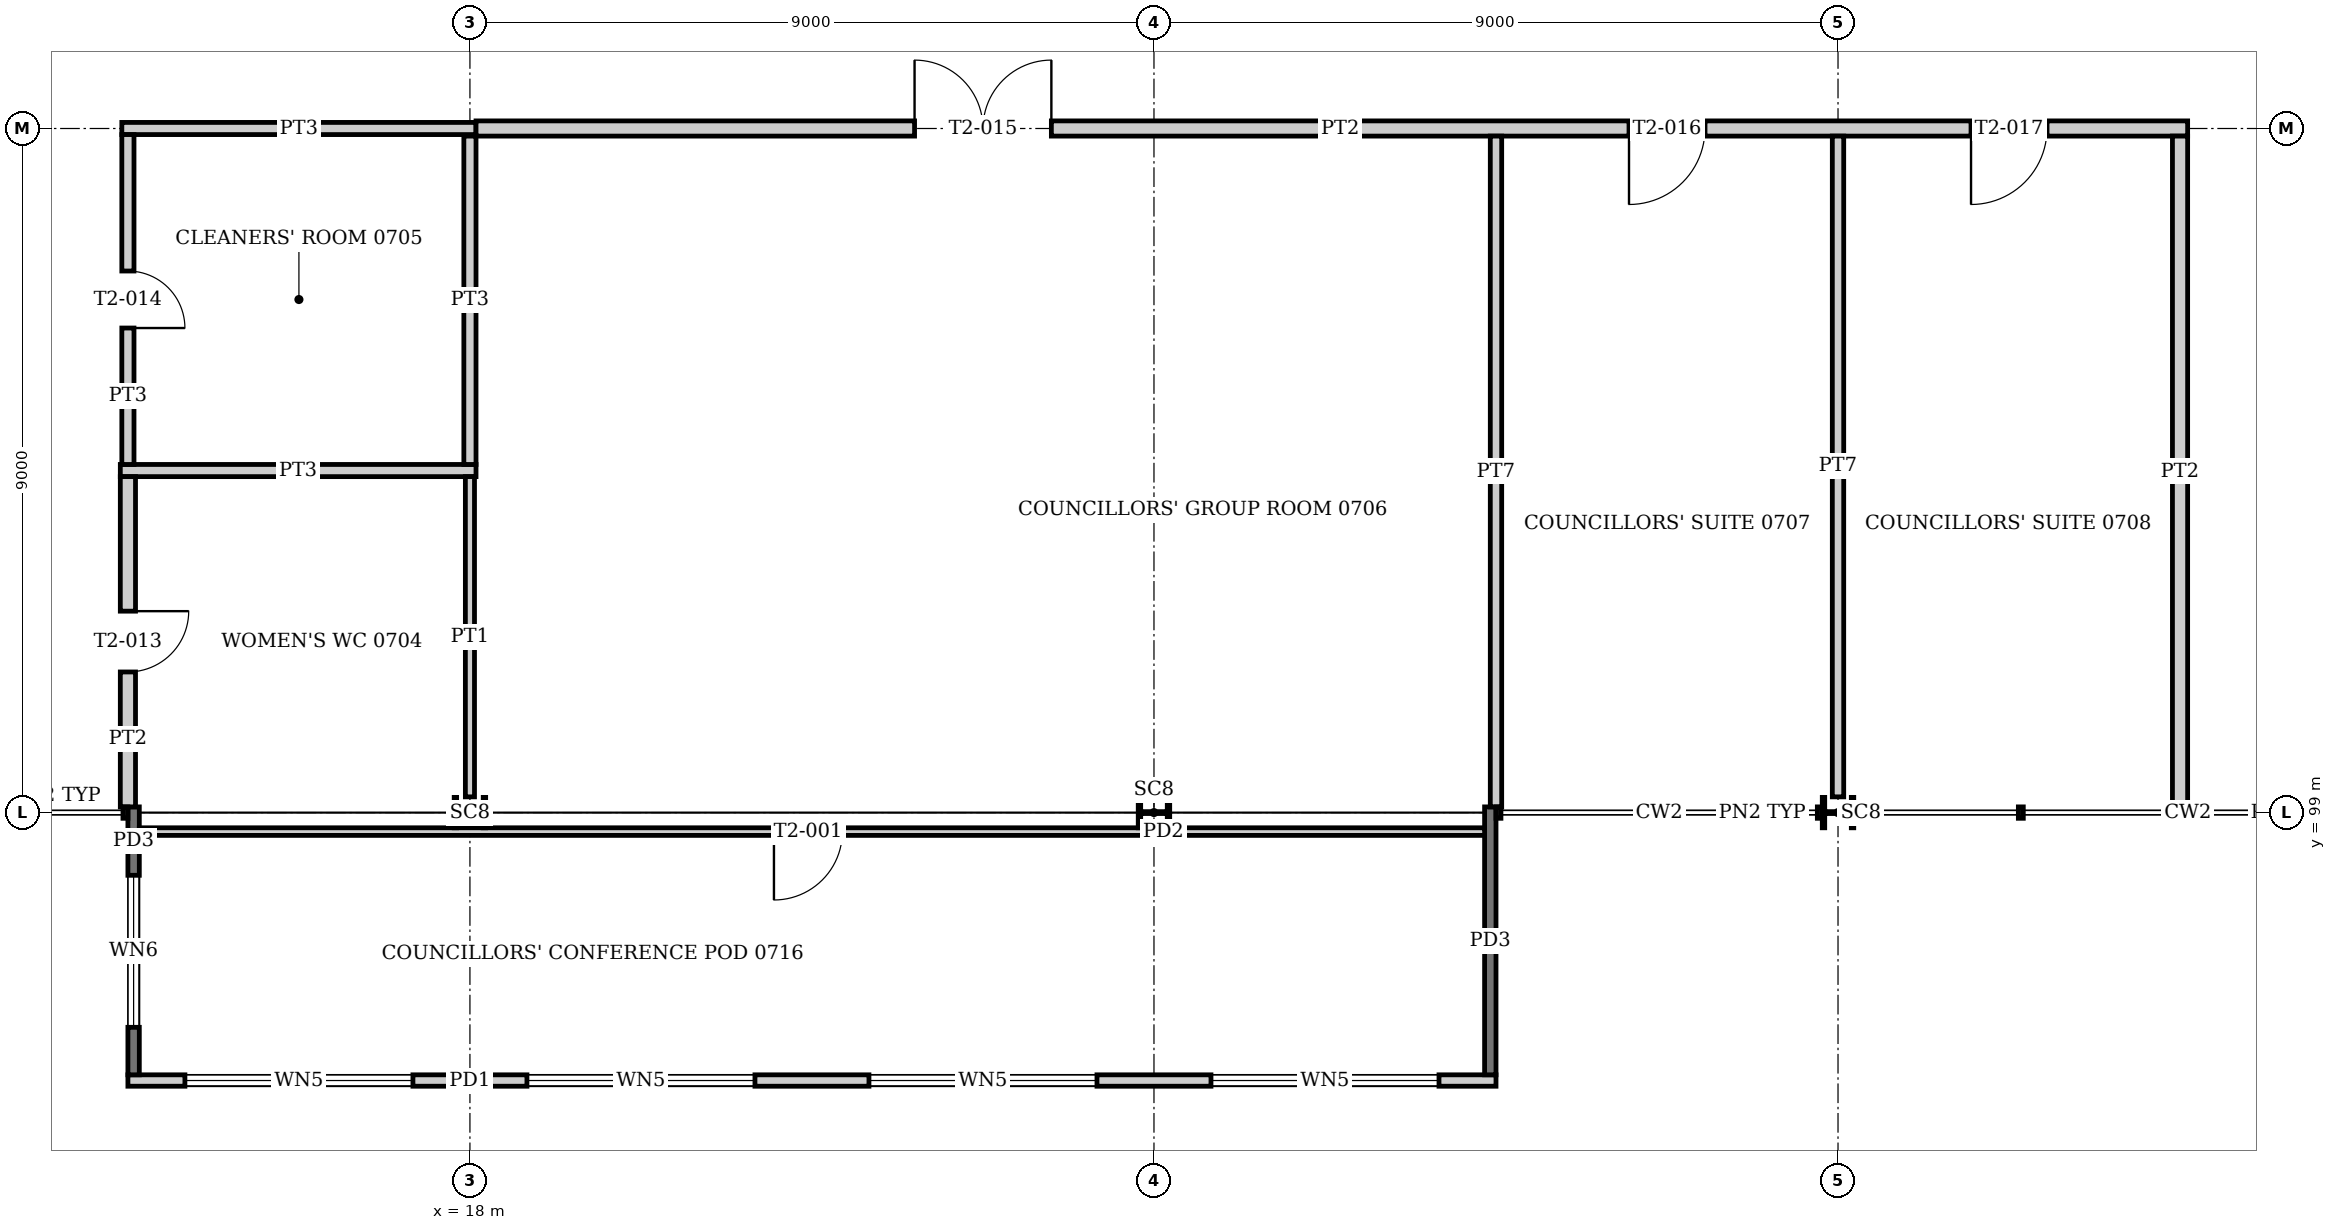
"""IFC4 building model, lengths in metres.
Left out: names, types, materials, properties, quantities, classifications, styles, units other than length and angle.
Written with IfcOpenShell. Run it as: python <this file> out.ifc"""

import sys

from ifc_helpers import new_model, si_unit, direction, frame, frame_2d, origin, origin_2d, place, context, subcontext, project, spatial, rectangle, i_section, extrude, element, fill, save


model = new_model("IFC4")
c1 = context("Model", 3, precision=1e-05, world=origin(), true_north=direction((0.0, 1.0)))
c2 = subcontext(c1, "Body", "Model", "MODEL_VIEW")
j1 = project(units=[si_unit("LENGTHUNIT", "METRE"), si_unit("PLANEANGLEUNIT", "RADIAN")], contexts=[c1])
p1 = place(None, origin())
s1 = spatial("IfcSite", under=j1, at=p1, CompositionType="ELEMENT")
p2 = place(p1, origin())
s2 = spatial("IfcBuilding", under=s1, at=p2, CompositionType="ELEMENT")
p3 = place(p2, frame((0.0, 0.0, 31.2)))
s3 = spatial("IfcBuildingStorey", under=s2, at=p3, CompositionType="ELEMENT", Elevation=31.2)
for number, where, z_axis, x_axis in (
    (1, (18.0, 99.0, 0.0), (0.0, 0.0, 1.0), (0.0, 1.0, 0.0)),
    (2, (27.0, 99.0, 0.0), (0.0, 0.0, 1.0), (0.0, 1.0, 0.0)),
    (3, (36.0, 99.0, 0.0), (0.0, 0.0, 1.0), (0.0, 1.0, 0.0)),
):
    element("IfcColumn", number, at=place(p3, frame(where, z_axis=z_axis, x_axis=x_axis)), inside=s3, PredefinedType="COLUMN", context=c2, shape_type="SweptSolid", body=[
        extrude(i_section(OverallWidth=0.4, OverallDepth=0.414, WebThickness=0.025, FlangeThickness=0.032, at=origin_2d()), origin(), (0.0, 0.0, 1.0), 4.0),
    ])
p4 = place(p3, frame((13.5, 95.475, 0.0), z_axis=(0.0, 0.0, 1.0), x_axis=(1.0, 0.0, 0.0)))
e4 = element("IfcWall", 4, at=p4, inside=s3, PredefinedType="SOLIDWALL", context=c2, shape_type="SweptSolid", body=[
    extrude(rectangle(XDim=18.0, YDim=0.15, at=frame_2d((9.0, 0.0))), origin(), (0.0, 0.0, 1.0), 2.6),
])
p5 = place(p4, frame((0.75, 0.0, 0.9)))
e5 = element("IfcOpeningElement", 5, at=p5, cuts=e4, PredefinedType="OPENING", context=c2, shape_type="SweptSolid", body=[
    extrude(rectangle(XDim=3.0, YDim=1.4, at=frame_2d((1.5, 0.7))), frame((0.0, 0.085, 0.0), z_axis=(0.0, -1.0, 0.0), x_axis=(1.0, 0.0, 0.0)), (0.0, 0.0, 1.0), 0.17),
])
p6 = place(p4, frame((5.25, 0.0, 0.9)))
e6 = element("IfcOpeningElement", 6, at=p6, cuts=e4, PredefinedType="OPENING", context=c2, shape_type="SweptSolid", body=[
    extrude(rectangle(XDim=3.0, YDim=1.4, at=frame_2d((1.5, 0.7))), frame((0.0, 0.085, 0.0), z_axis=(0.0, -1.0, 0.0), x_axis=(1.0, 0.0, 0.0)), (0.0, 0.0, 1.0), 0.17),
])
p7 = place(p4, frame((9.75, 0.0, 0.9)))
e7 = element("IfcOpeningElement", 7, at=p7, cuts=e4, PredefinedType="OPENING", context=c2, shape_type="SweptSolid", body=[
    extrude(rectangle(XDim=3.0, YDim=1.4, at=frame_2d((1.5, 0.7))), frame((0.0, 0.085, 0.0), z_axis=(0.0, -1.0, 0.0), x_axis=(1.0, 0.0, 0.0)), (0.0, 0.0, 1.0), 0.17),
])
p8 = place(p4, frame((14.25, 0.0, 0.9)))
e8 = element("IfcOpeningElement", 8, at=p8, cuts=e4, PredefinedType="OPENING", context=c2, shape_type="SweptSolid", body=[
    extrude(rectangle(XDim=3.0, YDim=1.4, at=frame_2d((1.5, 0.7))), frame((0.0, 0.085, 0.0), z_axis=(0.0, -1.0, 0.0), x_axis=(1.0, 0.0, 0.0)), (0.0, 0.0, 1.0), 0.17),
])
p9 = place(p3, frame((13.575, 95.55, -0.15), z_axis=(0.0, 0.0, 1.0), x_axis=(0.0, 1.0, 0.0)))
e9 = element("IfcWall", 9, at=p9, inside=s3, PredefinedType="SOLIDWALL", context=c2, shape_type="SweptSolid", body=[
    extrude(rectangle(XDim=3.525, YDim=0.15, at=frame_2d((1.762, 0.0))), origin(), (0.0, 0.0, 1.0), 2.75),
])
p10 = place(p9, frame((0.625, 0.0, 1.05)))
e10 = element("IfcOpeningElement", 10, at=p10, cuts=e9, PredefinedType="OPENING", context=c2, shape_type="SweptSolid", body=[
    extrude(rectangle(XDim=2.0, YDim=1.4, at=frame_2d((1.0, 0.7))), frame((0.0, 0.085, 0.0), z_axis=(0.0, -1.0, 0.0), x_axis=(1.0, 0.0, 0.0)), (0.0, 0.0, 1.0), 0.17),
])
p11 = place(p3, frame((31.425, 95.55, -0.15), z_axis=(0.0, 0.0, 1.0), x_axis=(0.0, 1.0, 0.0)))
e11 = element("IfcWall", 11, at=p11, inside=s3, PredefinedType="SOLIDWALL", context=c2, shape_type="SweptSolid", body=[
    extrude(rectangle(XDim=3.525, YDim=0.15, at=frame_2d((1.762, 0.0))), origin(), (0.0, 0.0, 1.0), 2.75),
])
p12 = place(p3, frame((13.65, 98.75, 0.0), z_axis=(0.0, 0.0, 1.0), x_axis=(1.0, 0.0, 0.0)))
e12 = element("IfcWall", 12, at=p12, inside=s3, PredefinedType="PARTITIONING", context=c2, shape_type="SweptSolid", body=[
    extrude(rectangle(XDim=17.7, YDim=0.1, at=frame_2d((8.85, 0.0))), origin(), (0.0, 0.0, 1.0), 2.6),
])
p13 = place(p12, frame((8.35, 0.0, 0.0)))
e13 = element("IfcOpeningElement", 13, at=p13, cuts=e12, PredefinedType="OPENING", context=c2, shape_type="SweptSolid", body=[
    extrude(rectangle(XDim=0.9, YDim=2.1, at=frame_2d((0.45, 1.05))), frame((0.0, 0.06, 0.0), z_axis=(0.0, -1.0, 0.0), x_axis=(1.0, 0.0, 0.0)), (0.0, 0.0, 1.0), 0.12),
])
p14 = place(p3, frame((13.4, 103.5, 0.0), z_axis=(0.0, 0.0, 1.0), x_axis=(1.0, 0.0, 0.0)))
e14 = element("IfcWall", 14, at=p14, inside=s3, PredefinedType="PARTITIONING", context=c2, shape_type="SweptSolid", body=[
    extrude(rectangle(XDim=4.68, YDim=0.16, at=frame_2d((2.34, 0.0))), origin(), (0.0, 0.0, 1.0), 3.05),
])
p15 = place(p3, frame((13.42, 108.0, 0.0), z_axis=(0.0, 0.0, 1.0), x_axis=(1.0, 0.0, 0.0)))
e15 = element("IfcWall", 15, at=p15, inside=s3, PredefinedType="PARTITIONING", context=c2, shape_type="SweptSolid", body=[
    extrude(rectangle(XDim=4.66, YDim=0.16, at=frame_2d((2.33, 0.0))), origin(), (0.0, 0.0, 1.0), 3.05),
])
p16 = place(p3, frame((18.08, 108.0, 0.0), z_axis=(0.0, 0.0, 1.0), x_axis=(1.0, 0.0, 0.0)))
e16 = element("IfcWall", 16, at=p16, inside=s3, PredefinedType="PARTITIONING", context=c2, shape_type="SweptSolid", body=[
    extrude(rectangle(XDim=22.52, YDim=0.2, at=frame_2d((11.26, 0.0))), origin(), (0.0, 0.0, 1.0), 3.05),
])
p17 = place(p16, frame((5.77, 0.0, 0.0)))
e17 = element("IfcOpeningElement", 17, at=p17, cuts=e16, PredefinedType="OPENING", context=c2, shape_type="SweptSolid", body=[
    extrude(rectangle(XDim=1.8, YDim=2.1, at=frame_2d((0.9, 1.05))), frame((0.0, 0.11, 0.0), z_axis=(0.0, -1.0, 0.0), x_axis=(1.0, 0.0, 0.0)), (0.0, 0.0, 1.0), 0.22),
])
p18 = place(p16, frame((15.17, 0.0, 0.0)))
e18 = element("IfcOpeningElement", 18, at=p18, cuts=e16, PredefinedType="OPENING", context=c2, shape_type="SweptSolid", body=[
    extrude(rectangle(XDim=1.0, YDim=2.1, at=frame_2d((0.5, 1.05))), frame((0.0, 0.11, 0.0), z_axis=(0.0, -1.0, 0.0), x_axis=(1.0, 0.0, 0.0)), (0.0, 0.0, 1.0), 0.22),
])
p19 = place(p16, frame((19.67, 0.0, 0.0)))
e19 = element("IfcOpeningElement", 19, at=p19, cuts=e16, PredefinedType="OPENING", context=c2, shape_type="SweptSolid", body=[
    extrude(rectangle(XDim=1.0, YDim=2.1, at=frame_2d((0.5, 1.05))), frame((0.0, 0.11, 0.0), z_axis=(0.0, -1.0, 0.0), x_axis=(1.0, 0.0, 0.0)), (0.0, 0.0, 1.0), 0.22),
])
p20 = place(p3, frame((13.5, 99.075, 0.0), z_axis=(0.0, 0.0, 1.0), x_axis=(0.0, 1.0, 0.0)))
e20 = element("IfcWall", 20, at=p20, inside=s3, PredefinedType="PARTITIONING", context=c2, shape_type="SweptSolid", body=[
    extrude(rectangle(XDim=4.345, YDim=0.2, at=frame_2d((2.172, 0.0))), origin(), (0.0, 0.0, 1.0), 3.05),
])
p21 = place(p20, frame((1.775, 0.0, 0.0)))
e21 = element("IfcOpeningElement", 21, at=p21, cuts=e20, PredefinedType="OPENING", context=c2, shape_type="SweptSolid", body=[
    extrude(rectangle(XDim=0.8, YDim=2.1, at=frame_2d((0.4, 1.05))), frame((0.0, 0.11, 0.0), z_axis=(0.0, -1.0, 0.0), x_axis=(1.0, 0.0, 0.0)), (0.0, 0.0, 1.0), 0.22),
])
p22 = place(p3, frame((13.5, 103.58, 0.0), z_axis=(0.0, 0.0, 1.0), x_axis=(0.0, 1.0, 0.0)))
e22 = element("IfcWall", 22, at=p22, inside=s3, PredefinedType="PARTITIONING", context=c2, shape_type="SweptSolid", body=[
    extrude(rectangle(XDim=4.34, YDim=0.16, at=frame_2d((2.17, 0.0))), origin(), (0.0, 0.0, 1.0), 3.05),
])
p23 = place(p22, frame((1.795, 0.0, 0.0)))
e23 = element("IfcOpeningElement", 23, at=p23, cuts=e22, PredefinedType="OPENING", context=c2, shape_type="SweptSolid", body=[
    extrude(rectangle(XDim=0.75, YDim=2.1, at=frame_2d((0.375, 1.05))), frame((0.0, 0.09, 0.0), z_axis=(0.0, -1.0, 0.0), x_axis=(1.0, 0.0, 0.0)), (0.0, 0.0, 1.0), 0.18),
])
p24 = place(p3, frame((18.0, 99.207, 0.0), z_axis=(0.0, 0.0, 1.0), x_axis=(0.0, 1.0, 0.0)))
e24 = element("IfcWall", 24, at=p24, inside=s3, PredefinedType="PARTITIONING", context=c2, shape_type="SweptSolid", body=[
    extrude(rectangle(XDim=4.213, YDim=0.12, at=frame_2d((2.106, 0.0))), origin(), (0.0, 0.0, 1.0), 3.05),
])
p25 = place(p3, frame((18.0, 103.58, 0.0), z_axis=(0.0, 0.0, 1.0), x_axis=(0.0, 1.0, 0.0)))
e25 = element("IfcWall", 25, at=p25, inside=s3, PredefinedType="PARTITIONING", context=c2, shape_type="SweptSolid", body=[
    extrude(rectangle(XDim=4.32, YDim=0.16, at=frame_2d((2.16, 0.0))), origin(), (0.0, 0.0, 1.0), 3.05),
])
p26 = place(p3, frame((31.5, 99.075, 0.0), z_axis=(0.0, 0.0, 1.0), x_axis=(0.0, 1.0, 0.0)))
e26 = element("IfcWall", 26, at=p26, inside=s3, PredefinedType="PARTITIONING", context=c2, shape_type="SweptSolid", body=[
    extrude(rectangle(XDim=8.825, YDim=0.15, at=frame_2d((4.413, 0.0))), origin(), (0.0, 0.0, 1.0), 3.05),
])
p27 = place(p3, frame((36.0, 99.207, 0.0), z_axis=(0.0, 0.0, 1.0), x_axis=(0.0, 1.0, 0.0)))
e27 = element("IfcWall", 27, at=p27, inside=s3, PredefinedType="PARTITIONING", context=c2, shape_type="SweptSolid", body=[
    extrude(rectangle(XDim=8.693, YDim=0.15, at=frame_2d((4.346, 0.0))), origin(), (0.0, 0.0, 1.0), 3.05),
])
p28 = place(p3, frame((40.5, 99.075, 0.0), z_axis=(0.0, 0.0, 1.0), x_axis=(0.0, 1.0, 0.0)))
e28 = element("IfcWall", 28, at=p28, inside=s3, PredefinedType="PARTITIONING", context=c2, shape_type="SweptSolid", body=[
    extrude(rectangle(XDim=8.825, YDim=0.2, at=frame_2d((4.413, 0.0))), origin(), (0.0, 0.0, 1.0), 3.05),
])
p29 = place(p5, origin())
e29 = element("IfcWindow", 29, at=p29, inside=s3, PartitioningType="SINGLE_PANEL", PredefinedType="WINDOW", context=c2, shape_type="SweptSolid", body=[
    extrude(rectangle(XDim=3.0, YDim=1.4, at=frame_2d((1.5, 0.7))), frame((0.0, 0.03, 0.0), z_axis=(0.0, -1.0, 0.0), x_axis=(1.0, 0.0, 0.0)), (0.0, 0.0, 1.0), 0.06),
])
fill(e5, e29)
p30 = place(p6, origin())
e30 = element("IfcWindow", 30, at=p30, inside=s3, PartitioningType="SINGLE_PANEL", PredefinedType="WINDOW", context=c2, shape_type="SweptSolid", body=[
    extrude(rectangle(XDim=3.0, YDim=1.4, at=frame_2d((1.5, 0.7))), frame((0.0, 0.03, 0.0), z_axis=(0.0, -1.0, 0.0), x_axis=(1.0, 0.0, 0.0)), (0.0, 0.0, 1.0), 0.06),
])
fill(e6, e30)
p31 = place(p7, origin())
e31 = element("IfcWindow", 31, at=p31, inside=s3, PartitioningType="SINGLE_PANEL", PredefinedType="WINDOW", context=c2, shape_type="SweptSolid", body=[
    extrude(rectangle(XDim=3.0, YDim=1.4, at=frame_2d((1.5, 0.7))), frame((0.0, 0.03, 0.0), z_axis=(0.0, -1.0, 0.0), x_axis=(1.0, 0.0, 0.0)), (0.0, 0.0, 1.0), 0.06),
])
fill(e7, e31)
p32 = place(p8, origin())
e32 = element("IfcWindow", 32, at=p32, inside=s3, PartitioningType="SINGLE_PANEL", PredefinedType="WINDOW", context=c2, shape_type="SweptSolid", body=[
    extrude(rectangle(XDim=3.0, YDim=1.4, at=frame_2d((1.5, 0.7))), frame((0.0, 0.03, 0.0), z_axis=(0.0, -1.0, 0.0), x_axis=(1.0, 0.0, 0.0)), (0.0, 0.0, 1.0), 0.06),
])
fill(e8, e32)
p33 = place(p10, origin())
e33 = element("IfcWindow", 33, at=p33, inside=s3, PartitioningType="SINGLE_PANEL", PredefinedType="WINDOW", context=c2, shape_type="SweptSolid", body=[
    extrude(rectangle(XDim=2.0, YDim=1.4, at=frame_2d((1.0, 0.7))), frame((0.0, 0.03, 0.0), z_axis=(0.0, -1.0, 0.0), x_axis=(1.0, 0.0, 0.0)), (0.0, 0.0, 1.0), 0.06),
])
fill(e10, e33)
p34 = place(p13, frame((0.9, 0.0, 0.0), z_axis=(0.0, 0.0, 1.0), x_axis=(-1.0, 0.0, 0.0)))
e34 = element("IfcDoor", 34, at=p34, inside=s3, OperationType="SINGLE_SWING_RIGHT", PredefinedType="DOOR", context=c2, shape_type="SweptSolid", body=[
    extrude(rectangle(XDim=0.9, YDim=2.1, at=frame_2d((0.45, 1.05))), frame((0.0, 0.025, 0.0), z_axis=(0.0, -1.0, 0.0), x_axis=(1.0, 0.0, 0.0)), (0.0, 0.0, 1.0), 0.05),
])
fill(e13, e34)
p35 = place(p21, frame((0.8, 0.0, 0.0), z_axis=(0.0, 0.0, 1.0), x_axis=(-1.0, 0.0, 0.0)))
e35 = element("IfcDoor", 35, at=p35, inside=s3, OperationType="SINGLE_SWING_LEFT", PredefinedType="DOOR", context=c2, shape_type="SweptSolid", body=[
    extrude(rectangle(XDim=0.8, YDim=2.1, at=frame_2d((0.4, 1.05))), frame((0.0, 0.025, 0.0), z_axis=(0.0, -1.0, 0.0), x_axis=(1.0, 0.0, 0.0)), (0.0, 0.0, 1.0), 0.05),
])
fill(e21, e35)
p36 = place(p23, frame((0.75, 0.0, 0.0), z_axis=(0.0, 0.0, 1.0), x_axis=(-1.0, 0.0, 0.0)))
e36 = element("IfcDoor", 36, at=p36, inside=s3, OperationType="SINGLE_SWING_RIGHT", PredefinedType="DOOR", context=c2, shape_type="SweptSolid", body=[
    extrude(rectangle(XDim=0.75, YDim=2.1, at=frame_2d((0.375, 1.05))), frame((0.0, 0.025, 0.0), z_axis=(0.0, -1.0, 0.0), x_axis=(1.0, 0.0, 0.0)), (0.0, 0.0, 1.0), 0.05),
])
fill(e23, e36)
p37 = place(p17, origin())
e37 = element("IfcDoor", 37, at=p37, inside=s3, OperationType="DOUBLE_DOOR_SINGLE_SWING", PredefinedType="DOOR", context=c2, shape_type="SweptSolid", body=[
    extrude(rectangle(XDim=1.8, YDim=2.1, at=frame_2d((0.9, 1.05))), frame((0.0, 0.025, 0.0), z_axis=(0.0, -1.0, 0.0), x_axis=(1.0, 0.0, 0.0)), (0.0, 0.0, 1.0), 0.05),
])
fill(e17, e37)
p38 = place(p18, frame((1.0, 0.0, 0.0), z_axis=(0.0, 0.0, 1.0), x_axis=(-1.0, 0.0, 0.0)))
e38 = element("IfcDoor", 38, at=p38, inside=s3, OperationType="SINGLE_SWING_RIGHT", PredefinedType="DOOR", context=c2, shape_type="SweptSolid", body=[
    extrude(rectangle(XDim=1.0, YDim=2.1, at=frame_2d((0.5, 1.05))), frame((0.0, 0.025, 0.0), z_axis=(0.0, -1.0, 0.0), x_axis=(1.0, 0.0, 0.0)), (0.0, 0.0, 1.0), 0.05),
])
fill(e18, e38)
p39 = place(p19, frame((1.0, 0.0, 0.0), z_axis=(0.0, 0.0, 1.0), x_axis=(-1.0, 0.0, 0.0)))
e39 = element("IfcDoor", 39, at=p39, inside=s3, OperationType="SINGLE_SWING_RIGHT", PredefinedType="DOOR", context=c2, shape_type="SweptSolid", body=[
    extrude(rectangle(XDim=1.0, YDim=2.1, at=frame_2d((0.5, 1.05))), frame((0.0, 0.025, 0.0), z_axis=(0.0, -1.0, 0.0), x_axis=(1.0, 0.0, 0.0)), (0.0, 0.0, 1.0), 0.05),
])
fill(e19, e39)
save(model, sys.argv[1])
